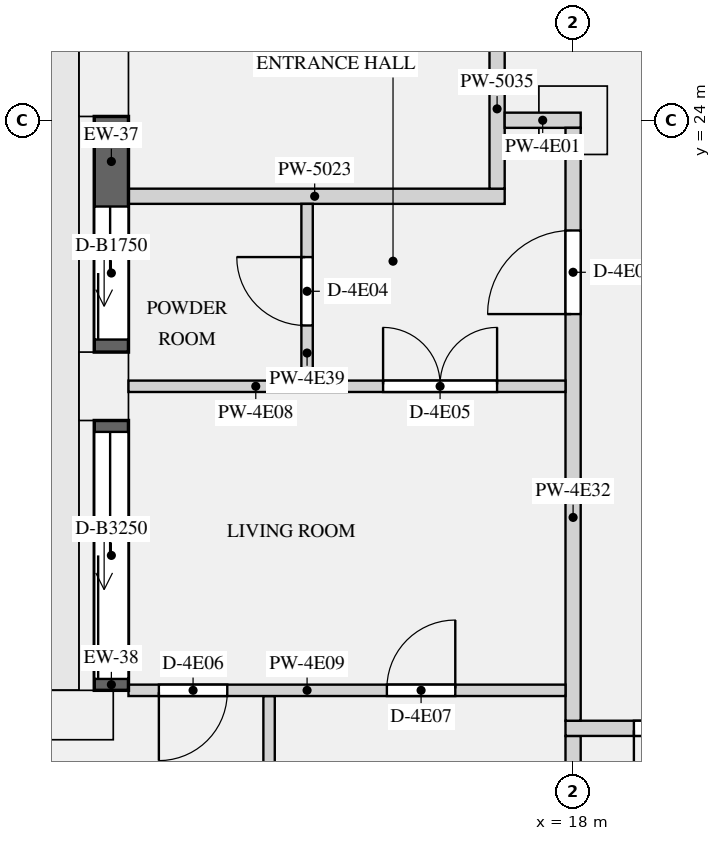
"""IFC4 building model, lengths in metres.
Left out: names, types, materials, properties, quantities, classifications, styles, units other than length and angle.
Written with IfcOpenShell. Run it as: python <this file> out.ifc"""

import sys

from ifc_helpers import new_model, si_unit, direction, frame, frame_2d, origin, origin_2d, place, context, subcontext, project, spatial, rectangle, extrude, element, fill, save


model = new_model("IFC4")
c1 = context("Model", 3, precision=1e-05, world=origin(), true_north=direction((0.0, 1.0)))
c2 = subcontext(c1, "Body", "Model", "MODEL_VIEW")
j1 = project(units=[si_unit("LENGTHUNIT", "METRE"), si_unit("PLANEANGLEUNIT", "RADIAN")], contexts=[c1])
p1 = place(None, origin())
s1 = spatial("IfcSite", under=j1, at=p1, CompositionType="ELEMENT")
p2 = place(p1, origin())
s2 = spatial("IfcBuilding", under=s1, at=p2, CompositionType="ELEMENT")
p3 = place(p2, frame((0.0, 0.0, 232.65)))
s3 = spatial("IfcBuildingStorey", under=s2, at=p3, CompositionType="ELEMENT", Elevation=232.65)
for number, where, z_axis, x_axis in (
    (1, (11.825, 24.5, 0.0), (0.0, 0.0, 1.0), (0.0, -1.0, 0.0)),
    (2, (11.825, 20.5, 0.0), (0.0, 0.0, 1.0), (0.0, -1.0, 0.0)),
    (3, (11.5, 16.175, 0.0), (0.0, 0.0, 1.0), (-1.0, 0.0, 0.0)),
):
    element("IfcColumn", number, at=place(p3, frame(where, z_axis=z_axis, x_axis=x_axis)), inside=s3, PredefinedType="USERDEFINED", context=c2, shape_type="SweptSolid", body=[
        extrude(rectangle(XDim=0.9, YDim=0.65, at=origin_2d()), origin(), (0.0, 0.0, 1.0), 3.15),
    ])
p4 = place(p3, frame((18.0, 24.0, 0.0), z_axis=(0.0, 0.0, 1.0), x_axis=(1.0, 0.0, 0.0)))
e4 = element("IfcColumn", 4, at=p4, inside=s3, PredefinedType="COLUMN", context=c2, shape_type="SweptSolid", body=[
    extrude(rectangle(XDim=0.9, YDim=0.9, at=origin_2d()), origin(), (0.0, 0.0, 1.0), 3.15),
])
p5 = place(p3, frame((11.925, 24.05, 0.0), z_axis=(0.0, 0.0, 1.0), x_axis=(0.0, -1.0, 0.0)))
e5 = element("IfcWall", 5, at=p5, inside=s3, PredefinedType="SOLIDWALL", context=c2, shape_type="SweptSolid", body=[
    extrude(rectangle(XDim=3.1, YDim=0.45, at=frame_2d((1.55, 0.0))), origin(), (0.0, 0.0, 1.0), 2.8),
])
p6 = place(p5, frame((1.185, 0.0, 0.0)))
e6 = element("IfcOpeningElement", 6, at=p6, cuts=e5, PredefinedType="OPENING", context=c2, shape_type="SweptSolid", body=[
    extrude(rectangle(XDim=1.75, YDim=2.3, at=frame_2d((0.875, 1.15))), frame((0.0, 0.235, 0.0), z_axis=(0.0, -1.0, 0.0), x_axis=(1.0, 0.0, 0.0)), (0.0, 0.0, 1.0), 0.47),
])
p7 = place(p3, frame((11.925, 20.05, 0.0), z_axis=(0.0, 0.0, 1.0), x_axis=(0.0, -1.0, 0.0)))
e7 = element("IfcWall", 7, at=p7, inside=s3, PredefinedType="SOLIDWALL", context=c2, shape_type="SweptSolid", body=[
    extrude(rectangle(XDim=3.55, YDim=0.45, at=frame_2d((1.775, 0.0))), origin(), (0.0, 0.0, 1.0), 2.8),
])
p8 = place(p7, frame((0.15, 0.0, 0.0)))
e8 = element("IfcOpeningElement", 8, at=p8, cuts=e7, PredefinedType="OPENING", context=c2, shape_type="SweptSolid", body=[
    extrude(rectangle(XDim=3.25, YDim=2.3, at=frame_2d((1.625, 1.15))), frame((0.0, 0.235, 0.0), z_axis=(0.0, -1.0, 0.0), x_axis=(1.0, 0.0, 0.0)), (0.0, 0.0, 1.0), 0.47),
])
p9 = place(p3, frame((12.1, 23.0, 0.0), z_axis=(0.0, 0.0, 1.0), x_axis=(1.0, 0.0, 0.0)))
e9 = element("IfcWall", 9, at=p9, inside=s3, PredefinedType="PARTITIONING", context=c2, shape_type="SweptSolid", body=[
    extrude(rectangle(XDim=5.0, YDim=0.2, at=frame_2d((2.5, 0.0))), origin(), (0.0, 0.0, 1.0), 2.8),
])
p10 = place(p3, frame((18.0, 12.5, 0.0), z_axis=(0.0, 0.0, 1.0), x_axis=(0.0, 1.0, 0.0)))
e10 = element("IfcWall", 10, at=p10, inside=s3, PredefinedType="PARTITIONING", context=c2, shape_type="SweptSolid", body=[
    extrude(rectangle(XDim=3.4, YDim=0.2, at=frame_2d((1.7, 0.0))), origin(), (0.0, 0.0, 1.0), 2.8),
])
p11 = place(p3, frame((17.0, 23.1, 0.0), z_axis=(0.0, 0.0, 1.0), x_axis=(0.0, 1.0, 0.0)))
e11 = element("IfcWall", 11, at=p11, inside=s3, PredefinedType="PARTITIONING", context=c2, shape_type="SweptSolid", body=[
    extrude(rectangle(XDim=3.8, YDim=0.2, at=frame_2d((1.9, 0.0))), origin(), (0.0, 0.0, 1.0), 2.8),
])
p12 = place(p11, frame((2.1, 0.0, 0.0)))
e12 = element("IfcOpeningElement", 12, at=p12, cuts=e11, PredefinedType="OPENING", context=c2, shape_type="SweptSolid", body=[
    extrude(rectangle(XDim=1.2, YDim=2.1, at=frame_2d((0.6, 1.05))), frame((0.0, 0.11, 0.0), z_axis=(0.0, -1.0, 0.0), x_axis=(1.0, 0.0, 0.0)), (0.0, 0.0, 1.0), 0.22),
])
p13 = place(p3, frame((17.1, 24.0, 0.0), z_axis=(0.0, 0.0, 1.0), x_axis=(1.0, 0.0, 0.0)))
e13 = element("IfcWall", 13, at=p13, inside=s3, PredefinedType="PARTITIONING", context=c2, shape_type="SweptSolid", body=[
    extrude(rectangle(XDim=1.0, YDim=0.2, at=frame_2d((0.5, 0.0))), origin(), (0.0, 0.0, 1.0), 2.8),
])
p14 = place(p3, frame((12.15, 20.5, 0.0), z_axis=(0.0, 0.0, 1.0), x_axis=(1.0, 0.0, 0.0)))
e14 = element("IfcWall", 14, at=p14, inside=s3, PredefinedType="PARTITIONING", context=c2, shape_type="SweptSolid", body=[
    extrude(rectangle(XDim=5.75, YDim=0.15, at=frame_2d((2.875, 0.0))), origin(), (0.0, 0.0, 1.0), 2.8),
])
p15 = place(p14, frame((3.35, 0.0, 0.0)))
e15 = element("IfcOpeningElement", 15, at=p15, cuts=e14, PredefinedType="OPENING", context=c2, shape_type="SweptSolid", body=[
    extrude(rectangle(XDim=1.5, YDim=2.1, at=frame_2d((0.75, 1.05))), frame((0.0, 0.085, 0.0), z_axis=(0.0, -1.0, 0.0), x_axis=(1.0, 0.0, 0.0)), (0.0, 0.0, 1.0), 0.17),
])
p16 = place(p3, frame((12.15, 16.5, 0.0), z_axis=(0.0, 0.0, 1.0), x_axis=(1.0, 0.0, 0.0)))
e16 = element("IfcWall", 16, at=p16, inside=s3, PredefinedType="PARTITIONING", context=c2, shape_type="SweptSolid", body=[
    extrude(rectangle(XDim=5.75, YDim=0.15, at=frame_2d((2.875, 0.0))), origin(), (0.0, 0.0, 1.0), 2.8),
])
p17 = place(p16, frame((0.4, 0.0, 0.0)))
e17 = element("IfcOpeningElement", 17, at=p17, cuts=e16, PredefinedType="OPENING", context=c2, shape_type="SweptSolid", body=[
    extrude(rectangle(XDim=0.9, YDim=2.1, at=frame_2d((0.45, 1.05))), frame((0.0, 0.085, 0.0), z_axis=(0.0, -1.0, 0.0), x_axis=(1.0, 0.0, 0.0)), (0.0, 0.0, 1.0), 0.17),
])
p18 = place(p16, frame((3.4, 0.0, 0.0)))
e18 = element("IfcOpeningElement", 18, at=p18, cuts=e16, PredefinedType="OPENING", context=c2, shape_type="SweptSolid", body=[
    extrude(rectangle(XDim=0.9, YDim=2.1, at=frame_2d((0.45, 1.05))), frame((0.0, 0.085, 0.0), z_axis=(0.0, -1.0, 0.0), x_axis=(1.0, 0.0, 0.0)), (0.0, 0.0, 1.0), 0.17),
])
p19 = place(p3, frame((17.9, 16.0, 0.0), z_axis=(0.0, 0.0, 1.0), x_axis=(1.0, 0.0, 0.0)))
e19 = element("IfcWall", 19, at=p19, inside=s3, PredefinedType="PARTITIONING", context=c2, shape_type="SweptSolid", body=[
    extrude(rectangle(XDim=36.2, YDim=0.2, at=frame_2d((18.1, 0.0))), origin(), (0.0, 0.0, 1.0), 2.8),
])
p20 = place(p19, frame((0.9, 0.0, 0.0)))
e20 = element("IfcOpeningElement", 20, at=p20, cuts=e19, PredefinedType="OPENING", context=c2, shape_type="SweptSolid", body=[
    extrude(rectangle(XDim=1.4, YDim=2.1, at=frame_2d((0.7, 1.05))), frame((0.0, 0.11, 0.0), z_axis=(0.0, -1.0, 0.0), x_axis=(1.0, 0.0, 0.0)), (0.0, 0.0, 1.0), 0.22),
])
p21 = place(p19, frame((33.9, 0.0, 0.0)))
e21 = element("IfcOpeningElement", 21, at=p21, cuts=e19, PredefinedType="OPENING", context=c2, shape_type="SweptSolid", body=[
    extrude(rectangle(XDim=1.4, YDim=2.1, at=frame_2d((0.7, 1.05))), frame((0.0, 0.11, 0.0), z_axis=(0.0, -1.0, 0.0), x_axis=(1.0, 0.0, 0.0)), (0.0, 0.0, 1.0), 0.22),
])
p22 = place(p3, frame((18.0, 16.1, 0.0), z_axis=(0.0, 0.0, 1.0), x_axis=(0.0, 1.0, 0.0)))
e22 = element("IfcWall", 22, at=p22, inside=s3, PredefinedType="PARTITIONING", context=c2, shape_type="SweptSolid", body=[
    extrude(rectangle(XDim=7.8, YDim=0.2, at=frame_2d((3.9, 0.0))), origin(), (0.0, 0.0, 1.0), 2.8),
])
p23 = place(p22, frame((5.35, 0.0, 0.0)))
e23 = element("IfcOpeningElement", 23, at=p23, cuts=e22, PredefinedType="OPENING", context=c2, shape_type="SweptSolid", body=[
    extrude(rectangle(XDim=1.1, YDim=2.1, at=frame_2d((0.55, 1.05))), frame((0.0, 0.11, 0.0), z_axis=(0.0, -1.0, 0.0), x_axis=(1.0, 0.0, 0.0)), (0.0, 0.0, 1.0), 0.22),
])
p24 = place(p3, frame((14.5, 20.575, 0.0), z_axis=(0.0, 0.0, 1.0), x_axis=(0.0, 1.0, 0.0)))
e24 = element("IfcWall", 24, at=p24, inside=s3, PredefinedType="PARTITIONING", context=c2, shape_type="SweptSolid", body=[
    extrude(rectangle(XDim=2.325, YDim=0.15, at=frame_2d((1.163, 0.0))), origin(), (0.0, 0.0, 1.0), 2.8),
])
p25 = place(p24, frame((0.725, 0.0, 0.0)))
e25 = element("IfcOpeningElement", 25, at=p25, cuts=e24, PredefinedType="OPENING", context=c2, shape_type="SweptSolid", body=[
    extrude(rectangle(XDim=0.9, YDim=2.1, at=frame_2d((0.45, 1.05))), frame((0.0, 0.085, 0.0), z_axis=(0.0, -1.0, 0.0), x_axis=(1.0, 0.0, 0.0)), (0.0, 0.0, 1.0), 0.17),
])
p26 = place(p3, frame((14.0, 8.575, 0.0), z_axis=(0.0, 0.0, 1.0), x_axis=(0.0, 1.0, 0.0)))
e26 = element("IfcWall", 26, at=p26, inside=s3, PredefinedType="PARTITIONING", context=c2, shape_type="SweptSolid", body=[
    extrude(rectangle(XDim=7.85, YDim=0.15, at=frame_2d((3.925, 0.0))), origin(), (0.0, 0.0, 1.0), 2.8),
])
p27 = place(p26, frame((1.475, 0.0, 0.0)))
e27 = element("IfcOpeningElement", 27, at=p27, cuts=e26, PredefinedType="OPENING", context=c2, shape_type="SweptSolid", body=[
    extrude(rectangle(XDim=0.9, YDim=2.1, at=frame_2d((0.45, 1.05))), frame((0.0, 0.085, 0.0), z_axis=(0.0, -1.0, 0.0), x_axis=(1.0, 0.0, 0.0)), (0.0, 0.0, 1.0), 0.17),
])
p28 = place(p6, origin())
e28 = element("IfcDoor", 28, at=p28, inside=s3, OperationType="SLIDING_TO_LEFT", PredefinedType="DOOR", context=c2, shape_type="SweptSolid", body=[
    extrude(rectangle(XDim=1.75, YDim=2.3, at=frame_2d((0.875, 1.15))), frame((0.0, -0.07, 0.0), z_axis=(0.0, -1.0, 0.0), x_axis=(1.0, 0.0, 0.0)), (0.0, 0.0, 1.0), 0.05),
])
fill(e6, e28)
p29 = place(p8, origin())
e29 = element("IfcDoor", 29, at=p29, inside=s3, OperationType="SLIDING_TO_LEFT", PredefinedType="DOOR", context=c2, shape_type="SweptSolid", body=[
    extrude(rectangle(XDim=3.25, YDim=2.3, at=frame_2d((1.625, 1.15))), frame((0.0, -0.07, 0.0), z_axis=(0.0, -1.0, 0.0), x_axis=(1.0, 0.0, 0.0)), (0.0, 0.0, 1.0), 0.05),
])
fill(e8, e29)
p30 = place(p20, frame((1.4, 0.0, 0.0), z_axis=(0.0, 0.0, 1.0), x_axis=(-1.0, 0.0, 0.0)))
e30 = element("IfcDoor", 30, at=p30, inside=s3, OperationType="DOUBLE_DOOR_SINGLE_SWING", PredefinedType="DOOR", context=c2, shape_type="SweptSolid", body=[
    extrude(rectangle(XDim=1.4, YDim=2.1, at=frame_2d((0.7, 1.05))), frame((0.0, 0.025, 0.0), z_axis=(0.0, -1.0, 0.0), x_axis=(1.0, 0.0, 0.0)), (0.0, 0.0, 1.0), 0.05),
])
fill(e20, e30)
p31 = place(p23, origin())
e31 = element("IfcDoor", 31, at=p31, inside=s3, OperationType="SINGLE_SWING_LEFT", PredefinedType="DOOR", context=c2, shape_type="SweptSolid", body=[
    extrude(rectangle(XDim=1.1, YDim=2.1, at=frame_2d((0.55, 1.05))), frame((0.0, 0.025, 0.0), z_axis=(0.0, -1.0, 0.0), x_axis=(1.0, 0.0, 0.0)), (0.0, 0.0, 1.0), 0.05),
])
fill(e23, e31)
p32 = place(p25, origin())
e32 = element("IfcDoor", 32, at=p32, inside=s3, OperationType="SINGLE_SWING_RIGHT", PredefinedType="DOOR", context=c2, shape_type="SweptSolid", body=[
    extrude(rectangle(XDim=0.9, YDim=2.1, at=frame_2d((0.45, 1.05))), frame((0.0, 0.025, 0.0), z_axis=(0.0, -1.0, 0.0), x_axis=(1.0, 0.0, 0.0)), (0.0, 0.0, 1.0), 0.05),
])
fill(e25, e32)
p33 = place(p15, origin())
e33 = element("IfcDoor", 33, at=p33, inside=s3, OperationType="DOUBLE_DOOR_SINGLE_SWING", PredefinedType="DOOR", context=c2, shape_type="SweptSolid", body=[
    extrude(rectangle(XDim=1.5, YDim=2.1, at=frame_2d((0.75, 1.05))), frame((0.0, 0.025, 0.0), z_axis=(0.0, -1.0, 0.0), x_axis=(1.0, 0.0, 0.0)), (0.0, 0.0, 1.0), 0.05),
])
fill(e15, e33)
p34 = place(p17, frame((0.9, 0.0, 0.0), z_axis=(0.0, 0.0, 1.0), x_axis=(-1.0, 0.0, 0.0)))
e34 = element("IfcDoor", 34, at=p34, inside=s3, OperationType="SINGLE_SWING_RIGHT", PredefinedType="DOOR", context=c2, shape_type="SweptSolid", body=[
    extrude(rectangle(XDim=0.9, YDim=2.1, at=frame_2d((0.45, 1.05))), frame((0.0, 0.025, 0.0), z_axis=(0.0, -1.0, 0.0), x_axis=(1.0, 0.0, 0.0)), (0.0, 0.0, 1.0), 0.05),
])
fill(e17, e34)
p35 = place(p18, origin())
e35 = element("IfcDoor", 35, at=p35, inside=s3, OperationType="SINGLE_SWING_RIGHT", PredefinedType="DOOR", context=c2, shape_type="SweptSolid", body=[
    extrude(rectangle(XDim=0.9, YDim=2.1, at=frame_2d((0.45, 1.05))), frame((0.0, 0.025, 0.0), z_axis=(0.0, -1.0, 0.0), x_axis=(1.0, 0.0, 0.0)), (0.0, 0.0, 1.0), 0.05),
])
fill(e18, e35)
save(model, sys.argv[1])
